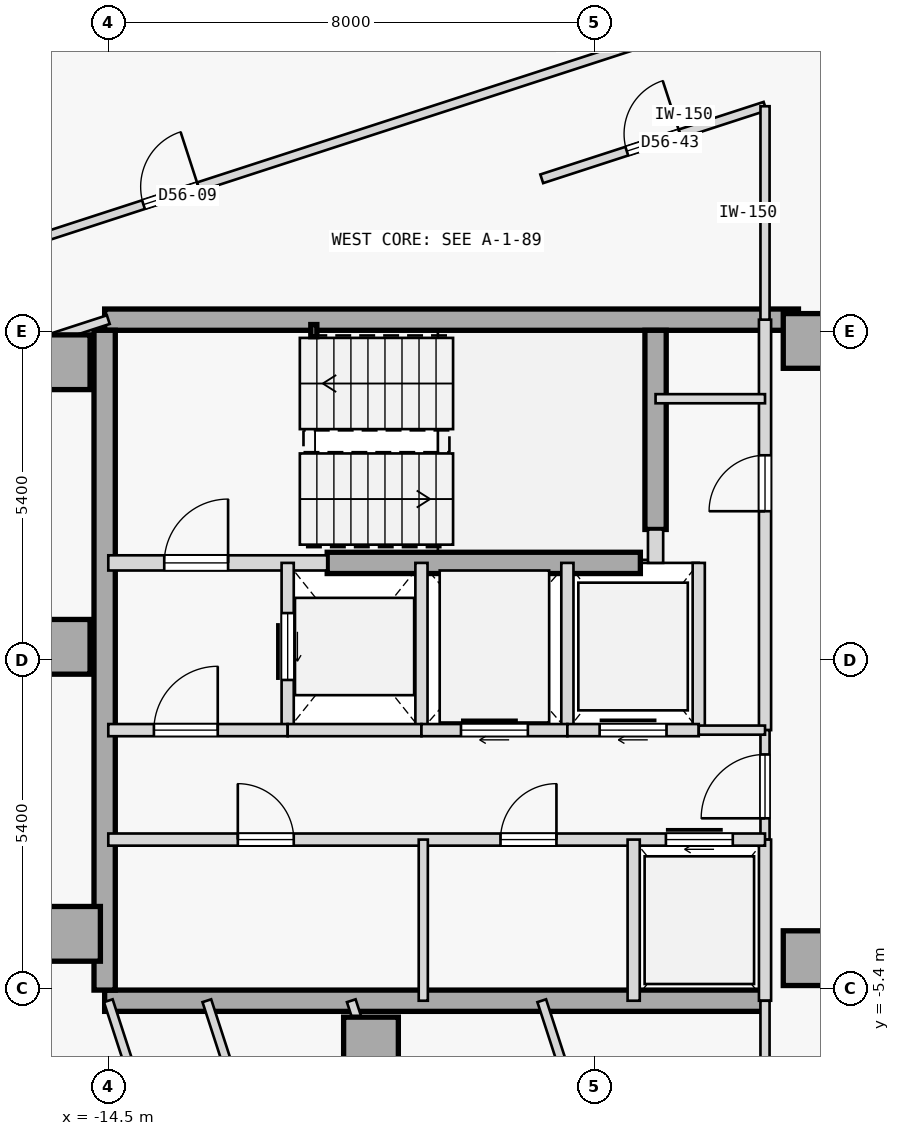
"""IFC4 building model, lengths in metres.
Left out: names, types, materials, properties, quantities, classifications, styles, units other than length and angle.
Written with IfcOpenShell. Run it as: python <this file> out.ifc"""

import sys

from ifc_helpers import new_model, si_unit, direction, frame, frame_2d, origin, origin_2d, place, context, subcontext, project, spatial, rectangle, hollow_rectangle, extrude, element, fill, save


model = new_model("IFC4")
c1 = context("Model", 3, precision=1e-05, world=origin(), true_north=direction((0.0, 1.0)))
c2 = subcontext(c1, "Body", "Model", "MODEL_VIEW")
j1 = project(units=[si_unit("LENGTHUNIT", "METRE"), si_unit("PLANEANGLEUNIT", "RADIAN")], contexts=[c1])
p1 = place(None, origin())
s1 = spatial("IfcSite", under=j1, at=p1, CompositionType="ELEMENT")
p2 = place(p1, origin())
s2 = spatial("IfcBuilding", under=s1, at=p2, CompositionType="ELEMENT")
p3 = place(p2, frame((0.0, 0.0, 214.25)))
s3 = spatial("IfcBuildingStorey", under=s2, at=p3, CompositionType="ELEMENT", Elevation=214.25)
for number, where, z_axis, x_axis in (
    (1, (-15.25, 4.9, 0.0), (0.0, 0.0, 1.0), (1.0, 0.0, 0.0)),
    (2, (-15.25, 0.22, 0.0), (0.0, 0.0, 1.0), (1.0, 0.0, 0.0)),
    (3, (-15.08, -4.5, 0.0), (0.0, 0.0, 1.0), (1.0, 0.0, 0.0)),
    (4, (-10.18, -6.32, 0.0), (0.0, 0.0, 1.0), (1.0, 0.0, 0.0)),
    (5, (-2.95, -4.9, 0.0), (0.0, 0.0, 1.0), (1.0, 0.0, 0.0)),
    (6, (-2.95, 5.25, 0.0), (0.0, 0.0, 1.0), (1.0, 0.0, 0.0)),
):
    element("IfcColumn", number, at=place(p3, frame(where, z_axis=z_axis, x_axis=x_axis)), inside=s3, PredefinedType="COLUMN", context=c2, shape_type="SweptSolid", body=[
        extrude(rectangle(XDim=0.9, YDim=0.9, at=origin_2d()), origin(), (0.0, 0.0, 1.0), 3.35),
    ])
p4 = place(p3, frame((-14.56, 5.6, 0.0), z_axis=(0.0, 0.0, 1.0), x_axis=(1.0, 0.0, 0.0)))
e7 = element("IfcWall", 7, at=p4, inside=s3, PredefinedType="SHEAR", context=c2, shape_type="SweptSolid", body=[
    extrude(rectangle(XDim=11.41, YDim=0.35, at=frame_2d((5.705, 0.0))), origin(), (0.0, 0.0, 1.0), 3.125),
])
p5 = place(p3, frame((-14.56, -5.6, 0.0), z_axis=(0.0, 0.0, 1.0), x_axis=(1.0, 0.0, 0.0)))
e8 = element("IfcWall", 8, at=p5, inside=s3, PredefinedType="SHEAR", context=c2, shape_type="SweptSolid", body=[
    extrude(rectangle(XDim=10.86, YDim=0.35, at=frame_2d((5.43, 0.0))), origin(), (0.0, 0.0, 1.0), 3.125),
])
p6 = place(p3, frame((-14.56, -5.425, 0.0), z_axis=(0.0, 0.0, 1.0), x_axis=(0.0, 1.0, 0.0)))
e9 = element("IfcWall", 9, at=p6, inside=s3, PredefinedType="SHEAR", context=c2, shape_type="SweptSolid", body=[
    extrude(rectangle(XDim=10.85, YDim=0.35, at=frame_2d((5.425, 0.0))), origin(), (0.0, 0.0, 1.0), 3.125),
])
p7 = place(p3, frame((-5.5, 2.15, 0.0), z_axis=(0.0, 0.0, 1.0), x_axis=(0.0, 1.0, 0.0)))
e10 = element("IfcWall", 10, at=p7, inside=s3, PredefinedType="SHEAR", context=c2, shape_type="SweptSolid", body=[
    extrude(rectangle(XDim=3.275, YDim=0.35, at=frame_2d((1.638, 0.0))), origin(), (0.0, 0.0, 1.0), 3.125),
])
p8 = place(p3, frame((-10.9, 1.6, 0.0), z_axis=(0.0, 0.0, 1.0), x_axis=(1.0, 0.0, 0.0)))
e11 = element("IfcWall", 11, at=p8, inside=s3, PredefinedType="SHEAR", context=c2, shape_type="SweptSolid", body=[
    extrude(rectangle(XDim=5.15, YDim=0.35, at=frame_2d((2.575, 0.0))), origin(), (0.0, 0.0, 1.0), 3.125),
])
p9 = place(p3, frame((-11.12, 5.42, 0.0), z_axis=(0.0, 0.0, 1.0), x_axis=(1.0, 0.0, 0.0)))
e12 = element("IfcColumn", 12, at=p9, inside=s3, PredefinedType="COLUMN", context=c2, shape_type="SweptSolid", body=[
    extrude(hollow_rectangle(XDim=0.1, YDim=0.2, WallThickness=0.008, at=origin_2d()), origin(), (0.0, 0.0, 1.0), 3.35),
])
p10 = place(p3, frame((-14.5, 1.6, 0.0), z_axis=(0.0, 0.0, 1.0), x_axis=(1.0, 0.0, 0.0)))
e13 = element("IfcWall", 13, at=p10, inside=s3, PredefinedType="STANDARD", context=c2, shape_type="SweptSolid", body=[
    extrude(rectangle(XDim=3.6, YDim=0.25, at=frame_2d((1.8, 0.0))), origin(), (0.0, 0.0, 1.0), 3.125),
])
p11 = place(p10, frame((0.92, 0.0, 0.0)))
e14 = element("IfcOpeningElement", 14, at=p11, cuts=e13, PredefinedType="OPENING", context=c2, shape_type="SweptSolid", body=[
    extrude(rectangle(XDim=1.05, YDim=2.15, at=frame_2d((0.525, 1.075))), frame((0.0, 0.135, 0.0), z_axis=(0.0, -1.0, 0.0), x_axis=(1.0, 0.0, 0.0)), (0.0, 0.0, 1.0), 0.27),
])
p12 = place(p3, frame((-5.5, 1.6, 0.0), z_axis=(0.0, 0.0, 1.0), x_axis=(0.0, 1.0, 0.0)))
e15 = element("IfcWall", 15, at=p12, inside=s3, PredefinedType="STANDARD", context=c2, shape_type="SweptSolid", body=[
    extrude(rectangle(XDim=0.55, YDim=0.25, at=frame_2d((0.275, 0.0))), origin(), (0.0, 0.0, 1.0), 3.125),
])
p13 = place(p3, frame((-3.7, -1.15, 0.0), z_axis=(0.0, 0.0, 1.0), x_axis=(0.0, 1.0, 0.0)))
e16 = element("IfcWall", 16, at=p13, inside=s3, PredefinedType="STANDARD", context=c2, shape_type="SweptSolid", body=[
    extrude(rectangle(XDim=6.75, YDim=0.2, at=frame_2d((3.375, 0.0))), origin(), (0.0, 0.0, 1.0), 3.125),
])
p14 = place(p13, frame((3.6, 0.0, 0.0)))
e17 = element("IfcOpeningElement", 17, at=p14, cuts=e16, PredefinedType="OPENING", context=c2, shape_type="SweptSolid", body=[
    extrude(rectangle(XDim=0.92, YDim=2.15, at=frame_2d((0.46, 1.075))), frame((0.0, 0.11, 0.0), z_axis=(0.0, -1.0, 0.0), x_axis=(1.0, 0.0, 0.0)), (0.0, 0.0, 1.0), 0.22),
])
p15 = place(p3, frame((-3.7, -2.95, 0.0), z_axis=(0.0, 0.0, 1.0), x_axis=(0.0, 1.0, 0.0)))
e18 = element("IfcWall", 18, at=p15, inside=s3, PredefinedType="PARTITIONING", context=c2, shape_type="SweptSolid", body=[
    extrude(rectangle(XDim=1.8, YDim=0.15, at=frame_2d((0.9, 0.0))), origin(), (0.0, 0.0, 1.0), 3.125),
])
p16 = place(p15, frame((0.35, 0.0, 0.0)))
e19 = element("IfcOpeningElement", 19, at=p16, cuts=e18, PredefinedType="OPENING", context=c2, shape_type="SweptSolid", body=[
    extrude(rectangle(XDim=1.05, YDim=2.18, at=frame_2d((0.525, 1.09))), frame((0.0, 0.085, 0.0), z_axis=(0.0, -1.0, 0.0), x_axis=(1.0, 0.0, 0.0)), (0.0, 0.0, 1.0), 0.17),
])
p17 = place(p3, frame((-3.7, -5.6, 0.0), z_axis=(0.0, 0.0, 1.0), x_axis=(0.0, 1.0, 0.0)))
e20 = element("IfcWall", 20, at=p17, inside=s3, PredefinedType="STANDARD", context=c2, shape_type="SweptSolid", body=[
    extrude(rectangle(XDim=2.65, YDim=0.2, at=frame_2d((1.325, 0.0))), origin(), (0.0, 0.0, 1.0), 3.125),
])
p18 = place(p3, frame((-11.55, -1.15, 0.0), z_axis=(0.0, 0.0, 1.0), x_axis=(0.0, 1.0, 0.0)))
e21 = element("IfcWall", 21, at=p18, inside=s3, PredefinedType="STANDARD", context=c2, shape_type="SweptSolid", body=[
    extrude(rectangle(XDim=2.75, YDim=0.2, at=frame_2d((1.375, 0.0))), origin(), (0.0, 0.0, 1.0), 3.125),
])
p19 = place(p18, frame((0.825, 0.0, 0.0)))
e22 = element("IfcOpeningElement", 22, at=p19, cuts=e21, PredefinedType="OPENING", context=c2, shape_type="SweptSolid", body=[
    extrude(rectangle(XDim=1.1, YDim=2.15, at=frame_2d((0.55, 1.075))), frame((0.0, 0.11, 0.0), z_axis=(0.0, -1.0, 0.0), x_axis=(1.0, 0.0, 0.0)), (0.0, 0.0, 1.0), 0.22),
])
p20 = place(p3, frame((-9.35, -1.15, 0.0), z_axis=(0.0, 0.0, 1.0), x_axis=(0.0, 1.0, 0.0)))
e23 = element("IfcWall", 23, at=p20, inside=s3, PredefinedType="STANDARD", context=c2, shape_type="SweptSolid", body=[
    extrude(rectangle(XDim=2.75, YDim=0.2, at=frame_2d((1.375, 0.0))), origin(), (0.0, 0.0, 1.0), 3.125),
])
p21 = place(p3, frame((-14.5, -1.15, 0.0), z_axis=(0.0, 0.0, 1.0), x_axis=(1.0, 0.0, 0.0)))
e24 = element("IfcWall", 24, at=p21, inside=s3, PredefinedType="STANDARD", context=c2, shape_type="SweptSolid", body=[
    extrude(rectangle(XDim=2.95, YDim=0.2, at=frame_2d((1.475, 0.0))), origin(), (0.0, 0.0, 1.0), 3.125),
])
p22 = place(p21, frame((0.75, 0.0, 0.0)))
e25 = element("IfcOpeningElement", 25, at=p22, cuts=e24, PredefinedType="OPENING", context=c2, shape_type="SweptSolid", body=[
    extrude(rectangle(XDim=1.05, YDim=2.18, at=frame_2d((0.525, 1.09))), frame((0.0, 0.11, 0.0), z_axis=(0.0, -1.0, 0.0), x_axis=(1.0, 0.0, 0.0)), (0.0, 0.0, 1.0), 0.22),
])
p23 = place(p3, frame((-11.55, -1.15, 0.0), z_axis=(0.0, 0.0, 1.0), x_axis=(1.0, 0.0, 0.0)))
e26 = element("IfcWall", 26, at=p23, inside=s3, PredefinedType="STANDARD", context=c2, shape_type="SweptSolid", body=[
    extrude(rectangle(XDim=2.2, YDim=0.2, at=frame_2d((1.1, 0.0))), origin(), (0.0, 0.0, 1.0), 3.125),
])
p24 = place(p3, frame((-6.95, -1.15, 0.0), z_axis=(0.0, 0.0, 1.0), x_axis=(0.0, 1.0, 0.0)))
e27 = element("IfcWall", 27, at=p24, inside=s3, PredefinedType="STANDARD", context=c2, shape_type="SweptSolid", body=[
    extrude(rectangle(XDim=2.75, YDim=0.2, at=frame_2d((1.375, 0.0))), origin(), (0.0, 0.0, 1.0), 3.125),
])
p25 = place(p3, frame((-9.35, -1.15, 0.0), z_axis=(0.0, 0.0, 1.0), x_axis=(1.0, 0.0, 0.0)))
e28 = element("IfcWall", 28, at=p25, inside=s3, PredefinedType="STANDARD", context=c2, shape_type="SweptSolid", body=[
    extrude(rectangle(XDim=2.4, YDim=0.2, at=frame_2d((1.2, 0.0))), origin(), (0.0, 0.0, 1.0), 3.125),
])
p26 = place(p25, frame((0.65, 0.0, 0.0)))
e29 = element("IfcOpeningElement", 29, at=p26, cuts=e28, PredefinedType="OPENING", context=c2, shape_type="SweptSolid", body=[
    extrude(rectangle(XDim=1.1, YDim=2.15, at=frame_2d((0.55, 1.075))), frame((0.0, 0.11, 0.0), z_axis=(0.0, -1.0, 0.0), x_axis=(1.0, 0.0, 0.0)), (0.0, 0.0, 1.0), 0.22),
])
p27 = place(p3, frame((-4.79, -1.15, 0.0), z_axis=(0.0, 0.0, 1.0), x_axis=(0.0, 1.0, 0.0)))
e30 = element("IfcWall", 30, at=p27, inside=s3, PredefinedType="STANDARD", context=c2, shape_type="SweptSolid", body=[
    extrude(rectangle(XDim=2.75, YDim=0.2, at=frame_2d((1.375, 0.0))), origin(), (0.0, 0.0, 1.0), 3.125),
])
p28 = place(p3, frame((-6.95, -1.15, 0.0), z_axis=(0.0, 0.0, 1.0), x_axis=(1.0, 0.0, 0.0)))
e31 = element("IfcWall", 31, at=p28, inside=s3, PredefinedType="STANDARD", context=c2, shape_type="SweptSolid", body=[
    extrude(rectangle(XDim=2.16, YDim=0.2, at=frame_2d((1.08, 0.0))), origin(), (0.0, 0.0, 1.0), 3.125),
])
p29 = place(p28, frame((0.53, 0.0, 0.0)))
e32 = element("IfcOpeningElement", 32, at=p29, cuts=e31, PredefinedType="OPENING", context=c2, shape_type="SweptSolid", body=[
    extrude(rectangle(XDim=1.1, YDim=2.15, at=frame_2d((0.55, 1.075))), frame((0.0, 0.11, 0.0), z_axis=(0.0, -1.0, 0.0), x_axis=(1.0, 0.0, 0.0)), (0.0, 0.0, 1.0), 0.22),
])
p30 = place(p3, frame((-4.79, -1.15, 0.0), z_axis=(0.0, 0.0, 1.0), x_axis=(1.0, 0.0, 0.0)))
e33 = element("IfcWall", 33, at=p30, inside=s3, PredefinedType="PARTITIONING", context=c2, shape_type="SweptSolid", body=[
    extrude(rectangle(XDim=1.09, YDim=0.15, at=frame_2d((0.545, 0.0))), origin(), (0.0, 0.0, 1.0), 3.125),
])
p31 = place(p3, frame((-14.5, -2.95, 0.0), z_axis=(0.0, 0.0, 1.0), x_axis=(1.0, 0.0, 0.0)))
e34 = element("IfcWall", 34, at=p31, inside=s3, PredefinedType="STANDARD", context=c2, shape_type="SweptSolid", body=[
    extrude(rectangle(XDim=10.8, YDim=0.2, at=frame_2d((5.4, 0.0))), origin(), (0.0, 0.0, 1.0), 3.125),
])
p32 = place(p31, frame((9.17, 0.0, 0.0)))
e35 = element("IfcOpeningElement", 35, at=p32, cuts=e34, PredefinedType="OPENING", context=c2, shape_type="SweptSolid", body=[
    extrude(rectangle(XDim=1.1, YDim=2.15, at=frame_2d((0.55, 1.075))), frame((0.0, 0.11, 0.0), z_axis=(0.0, -1.0, 0.0), x_axis=(1.0, 0.0, 0.0)), (0.0, 0.0, 1.0), 0.22),
])
p33 = place(p31, frame((2.13, 0.0, 0.0)))
e36 = element("IfcOpeningElement", 36, at=p33, cuts=e34, PredefinedType="OPENING", context=c2, shape_type="SweptSolid", body=[
    extrude(rectangle(XDim=0.92, YDim=2.15, at=frame_2d((0.46, 1.075))), frame((0.0, 0.11, 0.0), z_axis=(0.0, -1.0, 0.0), x_axis=(1.0, 0.0, 0.0)), (0.0, 0.0, 1.0), 0.22),
])
p34 = place(p31, frame((6.45, 0.0, 0.0)))
e37 = element("IfcOpeningElement", 37, at=p34, cuts=e34, PredefinedType="OPENING", context=c2, shape_type="SweptSolid", body=[
    extrude(rectangle(XDim=0.92, YDim=2.15, at=frame_2d((0.46, 1.075))), frame((0.0, 0.11, 0.0), z_axis=(0.0, -1.0, 0.0), x_axis=(1.0, 0.0, 0.0)), (0.0, 0.0, 1.0), 0.22),
])
p35 = place(p3, frame((-5.86, -5.6, 0.0), z_axis=(0.0, 0.0, 1.0), x_axis=(0.0, 1.0, 0.0)))
e38 = element("IfcWall", 38, at=p35, inside=s3, PredefinedType="STANDARD", context=c2, shape_type="SweptSolid", body=[
    extrude(rectangle(XDim=2.65, YDim=0.2, at=frame_2d((1.325, 0.0))), origin(), (0.0, 0.0, 1.0), 3.125),
])
p36 = place(p3, frame((-9.32, -5.6, 0.0), z_axis=(0.0, 0.0, 1.0), x_axis=(0.0, 1.0, 0.0)))
e39 = element("IfcWall", 39, at=p36, inside=s3, PredefinedType="PARTITIONING", context=c2, shape_type="SweptSolid", body=[
    extrude(rectangle(XDim=2.65, YDim=0.15, at=frame_2d((1.325, 0.0))), origin(), (0.0, 0.0, 1.0), 3.125),
])
p37 = place(p3, frame((-5.5, 4.3, 0.0), z_axis=(0.0, 0.0, 1.0), x_axis=(1.0, 0.0, 0.0)))
e40 = element("IfcWall", 40, at=p37, inside=s3, PredefinedType="PARTITIONING", context=c2, shape_type="SweptSolid", body=[
    extrude(rectangle(XDim=1.8, YDim=0.15, at=frame_2d((0.9, 0.0))), origin(), (0.0, 0.0, 1.0), 3.125),
])
p38 = place(p3, frame((-22.586, 4.677, 0.0), z_axis=(0.0, 0.0, 1.0), x_axis=(0.951057743275, 0.309013218095, 0.0)))
e41 = element("IfcWall", 41, at=p38, inside=s3, PredefinedType="PARTITIONING", context=c2, shape_type="SweptSolid", body=[
    extrude(rectangle(XDim=19.171, YDim=0.15, at=frame_2d((9.585, 0.0))), origin(), (0.0, 0.0, 1.0), 3.125),
])
p39 = place(p38, frame((9.111, 0.0, 0.0)))
e42 = element("IfcOpeningElement", 42, at=p39, cuts=e41, PredefinedType="OPENING", context=c2, shape_type="SweptSolid", body=[
    extrude(rectangle(XDim=0.95, YDim=2.15, at=frame_2d((0.475, 1.075))), frame((0.0, 0.085, 0.0), z_axis=(0.0, -1.0, 0.0), x_axis=(1.0, 0.0, 0.0)), (0.0, 0.0, 1.0), 0.17),
])
p40 = place(p3, frame((-3.7, -11.514, 0.0), z_axis=(0.0, 0.0, 1.0), x_axis=(-8.2572974e-05, 0.999999996591, 0.0)))
e43 = element("IfcWall", 43, at=p40, inside=s3, PredefinedType="PARTITIONING", context=c2, shape_type="SweptSolid", body=[
    extrude(rectangle(XDim=5.913, YDim=0.15, at=frame_2d((2.957, 0.0))), origin(), (0.0, 0.0, 1.0), 3.125),
])
p41 = place(p40, frame((2.497, 0.0, 0.0)))
e44 = element("IfcOpeningElement", 44, at=p41, cuts=e43, PredefinedType="OPENING", context=c2, shape_type="SweptSolid", body=[
    extrude(rectangle(XDim=0.92, YDim=2.15, at=frame_2d((0.46, 1.075))), frame((0.0, 0.085, 0.0), z_axis=(0.0, -1.0, 0.0), x_axis=(1.0, 0.0, 0.0)), (0.0, 0.0, 1.0), 0.17),
])
p42 = place(p3, frame((-17.792, 4.531, 0.0), z_axis=(0.0, 0.0, 1.0), x_axis=(0.951047546178, 0.309044600193, 0.0)))
e45 = element("IfcWall", 45, at=p42, inside=s3, PredefinedType="PARTITIONING", context=c2, shape_type="SweptSolid", body=[
    extrude(rectangle(XDim=3.461, YDim=0.15, at=frame_2d((1.73, 0.0))), origin(), (0.0, 0.0, 1.0), 3.125),
])
p43 = place(p42, frame((0.302, 0.0, 0.0)))
e46 = element("IfcOpeningElement", 46, at=p43, cuts=e45, PredefinedType="OPENING", context=c2, shape_type="SweptSolid", body=[
    extrude(rectangle(XDim=0.92, YDim=2.15, at=frame_2d((0.46, 1.075))), frame((0.0, 0.085, 0.0), z_axis=(0.0, -1.0, 0.0), x_axis=(1.0, 0.0, 0.0)), (0.0, 0.0, 1.0), 0.17),
])
p44 = place(p3, frame((-7.372, 7.917, 0.0), z_axis=(0.0, 0.0, 1.0), x_axis=(0.951052654993, 0.309028877989, 0.0)))
e47 = element("IfcWall", 47, at=p44, inside=s3, PredefinedType="PARTITIONING", context=c2, shape_type="SweptSolid", body=[
    extrude(rectangle(XDim=3.861, YDim=0.15, at=frame_2d((1.93, 0.0))), origin(), (0.0, 0.0, 1.0), 3.125),
])
p45 = place(p44, frame((1.47, 0.0, 0.0)))
e48 = element("IfcOpeningElement", 48, at=p45, cuts=e47, PredefinedType="OPENING", context=c2, shape_type="SweptSolid", body=[
    extrude(rectangle(XDim=0.92, YDim=2.15, at=frame_2d((0.46, 1.075))), frame((0.0, 0.085, 0.0), z_axis=(0.0, -1.0, 0.0), x_axis=(1.0, 0.0, 0.0)), (0.0, 0.0, 1.0), 0.17),
])
p46 = place(p3, frame((-3.7, 5.6, 0.0), z_axis=(0.0, 0.0, 1.0), x_axis=(0.000139120755, 0.999999990323, 0.0)))
e49 = element("IfcWall", 49, at=p46, inside=s3, PredefinedType="PARTITIONING", context=c2, shape_type="SweptSolid", body=[
    extrude(rectangle(XDim=3.51, YDim=0.15, at=frame_2d((1.755, 0.0))), origin(), (0.0, 0.0, 1.0), 3.125),
])
p47 = place(p3, frame((-30.663, -9.757, 0.0), z_axis=(0.0, 0.0, 1.0), x_axis=(0.951058192995, 0.309011833974, 0.0)))
e50 = element("IfcWall", 50, at=p47, inside=s3, PredefinedType="PARTITIONING", context=c2, shape_type="SweptSolid", body=[
    extrude(rectangle(XDim=16.657, YDim=0.15, at=frame_2d((8.329, 0.0))), origin(), (0.0, 0.0, 1.0), 3.125),
])
p48 = place(p3, frame((-13.488, -8.713, 0.0), z_axis=(0.0, 0.0, 1.0), x_axis=(-0.309082700143, 0.951035164687, 0.0)))
e51 = element("IfcWall", 51, at=p48, inside=s3, PredefinedType="PARTITIONING", context=c2, shape_type="SweptSolid", body=[
    extrude(rectangle(XDim=3.274, YDim=0.15, at=frame_2d((1.637, 0.0))), origin(), (0.0, 0.0, 1.0), 3.125),
])
p49 = place(p3, frame((-10.265, -13.647, 0.0), z_axis=(0.0, 0.0, 1.0), x_axis=(-0.309007776314, 0.951059511375, 0.0)))
e52 = element("IfcWall", 52, at=p49, inside=s3, PredefinedType="PARTITIONING", context=c2, shape_type="SweptSolid", body=[
    extrude(rectangle(XDim=8.461, YDim=0.15, at=frame_2d((4.23, 0.0))), origin(), (0.0, 0.0, 1.0), 3.125),
])
p50 = place(p3, frame((-8.116, -12.949, 0.0), z_axis=(0.0, 0.0, 1.0), x_axis=(-0.309005340707, 0.951060302722, 0.0)))
e53 = element("IfcWall", 53, at=p50, inside=s3, PredefinedType="PARTITIONING", context=c2, shape_type="SweptSolid", body=[
    extrude(rectangle(XDim=7.727, YDim=0.15, at=frame_2d((3.864, 0.0))), origin(), (0.0, 0.0, 1.0), 3.125),
])
p51 = place(p3, frame((-5.283, -12.028, 0.0), z_axis=(0.0, 0.0, 1.0), x_axis=(-0.30901256406, 0.95105795578, 0.0)))
e54 = element("IfcWall", 54, at=p51, inside=s3, PredefinedType="PARTITIONING", context=c2, shape_type="SweptSolid", body=[
    extrude(rectangle(XDim=6.759, YDim=0.15, at=frame_2d((3.379, 0.0))), origin(), (0.0, 0.0, 1.0), 3.125),
])
p52 = place(p11, origin())
e55 = element("IfcDoor", 55, at=p52, inside=s3, OperationType="SINGLE_SWING_RIGHT", PredefinedType="DOOR", context=c2, shape_type="SweptSolid", body=[
    extrude(rectangle(XDim=1.05, YDim=2.15, at=frame_2d((0.525, 1.075))), frame((0.0, 0.025, 0.0), z_axis=(0.0, -1.0, 0.0), x_axis=(1.0, 0.0, 0.0)), (0.0, 0.0, 1.0), 0.05),
])
fill(e14, e55)
p53 = place(p22, origin())
e56 = element("IfcDoor", 56, at=p53, inside=s3, OperationType="SINGLE_SWING_RIGHT", PredefinedType="DOOR", context=c2, shape_type="SweptSolid", body=[
    extrude(rectangle(XDim=1.05, YDim=2.18, at=frame_2d((0.525, 1.09))), frame((0.0, 0.025, 0.0), z_axis=(0.0, -1.0, 0.0), x_axis=(1.0, 0.0, 0.0)), (0.0, 0.0, 1.0), 0.05),
])
fill(e25, e56)
p54 = place(p16, origin())
e57 = element("IfcDoor", 57, at=p54, inside=s3, OperationType="SINGLE_SWING_LEFT", PredefinedType="DOOR", context=c2, shape_type="SweptSolid", body=[
    extrude(rectangle(XDim=1.05, YDim=2.18, at=frame_2d((0.525, 1.09))), frame((0.0, 0.025, 0.0), z_axis=(0.0, -1.0, 0.0), x_axis=(1.0, 0.0, 0.0)), (0.0, 0.0, 1.0), 0.05),
])
fill(e19, e57)
p55 = place(p19, origin())
e58 = element("IfcDoor", 58, at=p55, inside=s3, OperationType="SLIDING_TO_RIGHT", PredefinedType="DOOR", context=c2, shape_type="SweptSolid", body=[
    extrude(rectangle(XDim=1.1, YDim=2.15, at=frame_2d((0.55, 1.075))), frame((0.0, 0.025, 0.0), z_axis=(0.0, -1.0, 0.0), x_axis=(1.0, 0.0, 0.0)), (0.0, 0.0, 1.0), 0.05),
])
fill(e22, e58)
p56 = place(p26, origin())
e59 = element("IfcDoor", 59, at=p56, inside=s3, OperationType="SLIDING_TO_RIGHT", PredefinedType="DOOR", context=c2, shape_type="SweptSolid", body=[
    extrude(rectangle(XDim=1.1, YDim=2.15, at=frame_2d((0.55, 1.075))), frame((0.0, 0.025, 0.0), z_axis=(0.0, -1.0, 0.0), x_axis=(1.0, 0.0, 0.0)), (0.0, 0.0, 1.0), 0.05),
])
fill(e29, e59)
p57 = place(p29, origin())
e60 = element("IfcDoor", 60, at=p57, inside=s3, OperationType="SLIDING_TO_RIGHT", PredefinedType="DOOR", context=c2, shape_type="SweptSolid", body=[
    extrude(rectangle(XDim=1.1, YDim=2.15, at=frame_2d((0.55, 1.075))), frame((0.0, 0.025, 0.0), z_axis=(0.0, -1.0, 0.0), x_axis=(1.0, 0.0, 0.0)), (0.0, 0.0, 1.0), 0.05),
])
fill(e32, e60)
p58 = place(p32, origin())
e61 = element("IfcDoor", 61, at=p58, inside=s3, OperationType="SLIDING_TO_RIGHT", PredefinedType="DOOR", context=c2, shape_type="SweptSolid", body=[
    extrude(rectangle(XDim=1.1, YDim=2.15, at=frame_2d((0.55, 1.075))), frame((0.0, 0.025, 0.0), z_axis=(0.0, -1.0, 0.0), x_axis=(1.0, 0.0, 0.0)), (0.0, 0.0, 1.0), 0.05),
])
fill(e35, e61)
p59 = place(p33, origin())
e62 = element("IfcDoor", 62, at=p59, inside=s3, OperationType="SINGLE_SWING_LEFT", PredefinedType="DOOR", context=c2, shape_type="SweptSolid", body=[
    extrude(rectangle(XDim=0.92, YDim=2.15, at=frame_2d((0.46, 1.075))), frame((0.0, 0.025, 0.0), z_axis=(0.0, -1.0, 0.0), x_axis=(1.0, 0.0, 0.0)), (0.0, 0.0, 1.0), 0.05),
])
fill(e36, e62)
p60 = place(p34, origin())
e63 = element("IfcDoor", 63, at=p60, inside=s3, OperationType="SINGLE_SWING_RIGHT", PredefinedType="DOOR", context=c2, shape_type="SweptSolid", body=[
    extrude(rectangle(XDim=0.92, YDim=2.15, at=frame_2d((0.46, 1.075))), frame((0.0, 0.025, 0.0), z_axis=(0.0, -1.0, 0.0), x_axis=(1.0, 0.0, 0.0)), (0.0, 0.0, 1.0), 0.05),
])
fill(e37, e63)
p61 = place(p14, origin())
e64 = element("IfcDoor", 64, at=p61, inside=s3, OperationType="SINGLE_SWING_LEFT", PredefinedType="DOOR", context=c2, shape_type="SweptSolid", body=[
    extrude(rectangle(XDim=0.92, YDim=2.15, at=frame_2d((0.46, 1.075))), frame((0.0, 0.025, 0.0), z_axis=(0.0, -1.0, 0.0), x_axis=(1.0, 0.0, 0.0)), (0.0, 0.0, 1.0), 0.05),
])
fill(e17, e64)
p62 = place(p39, origin())
e65 = element("IfcDoor", 65, at=p62, inside=s3, OperationType="SINGLE_SWING_RIGHT", PredefinedType="DOOR", context=c2, shape_type="SweptSolid", body=[
    extrude(rectangle(XDim=0.95, YDim=2.15, at=frame_2d((0.475, 1.075))), frame((0.0, 0.025, 0.0), z_axis=(0.0, -1.0, 0.0), x_axis=(1.0, 0.0, 0.0)), (0.0, 0.0, 1.0), 0.05),
])
fill(e42, e65)
p63 = place(p45, origin())
e66 = element("IfcDoor", 66, at=p63, inside=s3, OperationType="SINGLE_SWING_RIGHT", PredefinedType="DOOR", context=c2, shape_type="SweptSolid", body=[
    extrude(rectangle(XDim=0.92, YDim=2.15, at=frame_2d((0.46, 1.075))), frame((0.0, 0.025, 0.0), z_axis=(0.0, -1.0, 0.0), x_axis=(1.0, 0.0, 0.0)), (0.0, 0.0, 1.0), 0.05),
])
fill(e48, e66)
save(model, sys.argv[1])
